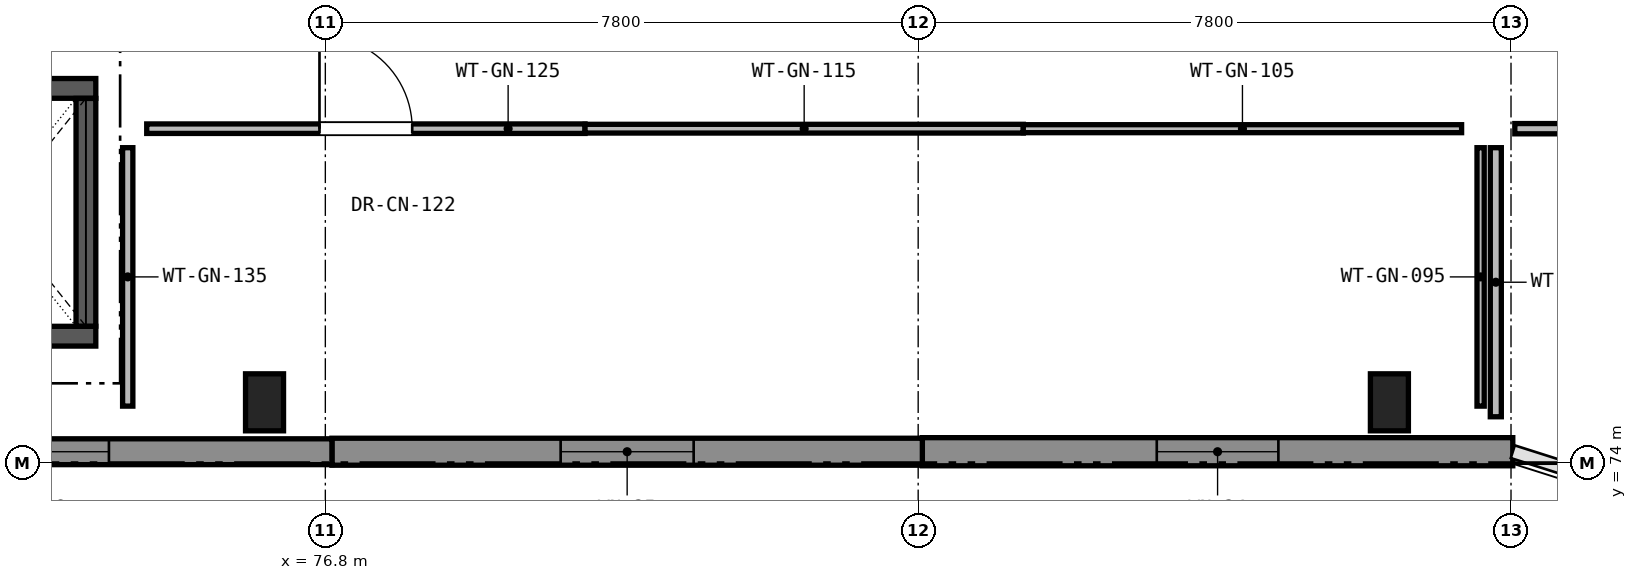
"""IFC4 building model, lengths in metres.
Left out: names, types, materials, properties, quantities, classifications, styles, units other than length and angle.
Written with IfcOpenShell. Run it as: python <this file> out.ifc"""

import sys

from ifc_helpers import new_model, si_unit, direction, frame, frame_2d, origin, origin_2d, place, context, subcontext, project, spatial, rectangle, extrude, element, fill, save


model = new_model("IFC4")
c1 = context("Model", 3, precision=1e-05, world=origin(), true_north=direction((0.0, 1.0)))
c2 = subcontext(c1, "Body", "Model", "MODEL_VIEW")
j1 = project(units=[si_unit("LENGTHUNIT", "METRE"), si_unit("PLANEANGLEUNIT", "RADIAN")], contexts=[c1])
p1 = place(None, origin())
s1 = spatial("IfcSite", under=j1, at=p1, CompositionType="ELEMENT")
p2 = place(p1, origin())
s2 = spatial("IfcBuilding", under=s1, at=p2, CompositionType="ELEMENT")
p3 = place(p2, frame((0.0, 0.0, 5.1)))
s3 = spatial("IfcBuildingStorey", under=s2, at=p3, CompositionType="ELEMENT", Elevation=5.1)
for number, where, z_axis, x_axis in (
    (1, (76.0, 74.8, 0.0), (0.0, 0.0, 1.0), (1.0, 0.0, 0.0)),
    (2, (90.8, 74.8, 0.0), (0.0, 0.0, 1.0), (1.0, 0.0, 0.0)),
):
    element("IfcColumn", number, at=place(p3, frame(where, z_axis=z_axis, x_axis=x_axis)), inside=s3, PredefinedType="COLUMN", context=c2, shape_type="SweptSolid", body=[
        extrude(rectangle(XDim=0.5, YDim=0.75, at=origin_2d()), origin(), (0.0, 0.0, 1.0), 4.42),
    ])
p4 = place(p3, frame((92.423, 74.15, 0.0), z_axis=(0.0, 0.0, 1.0), x_axis=(-1.0, 0.0, 0.0)))
e3 = element("IfcWall", 3, at=p4, inside=s3, PredefinedType="SOLIDWALL", context=c2, shape_type="SweptSolid", body=[
    extrude(rectangle(XDim=7.768, YDim=0.37, at=frame_2d((3.884, 0.0))), origin(), (0.0, 0.0, 1.0), 4.145),
])
p5 = place(p4, frame((3.084, 0.0, 0.9)))
e4 = element("IfcOpeningElement", 4, at=p5, cuts=e3, PredefinedType="OPENING", context=c2, shape_type="SweptSolid", body=[
    extrude(rectangle(XDim=1.6, YDim=2.0, at=frame_2d((0.8, 1.0))), frame((0.0, 0.195, 0.0), z_axis=(0.0, -1.0, 0.0), x_axis=(1.0, 0.0, 0.0)), (0.0, 0.0, 1.0), 0.39),
])
p6 = place(p3, frame((84.655, 74.15, 0.0), z_axis=(0.0, 0.0, 1.0), x_axis=(-1.0, 0.0, 0.0)))
e5 = element("IfcWall", 5, at=p6, inside=s3, PredefinedType="SOLIDWALL", context=c2, shape_type="SweptSolid", body=[
    extrude(rectangle(XDim=7.768, YDim=0.355, at=frame_2d((3.884, 0.0))), origin(), (0.0, 0.0, 1.0), 4.145),
])
p7 = place(p6, frame((3.009, 0.0, 0.9)))
e6 = element("IfcOpeningElement", 6, at=p7, cuts=e5, PredefinedType="OPENING", context=c2, shape_type="SweptSolid", body=[
    extrude(rectangle(XDim=1.75, YDim=2.0, at=frame_2d((0.875, 1.0))), frame((0.0, 0.188, 0.0), z_axis=(0.0, -1.0, 0.0), x_axis=(1.0, 0.0, 0.0)), (0.0, 0.0, 1.0), 0.375),
])
p8 = place(p3, frame((76.887, 74.15, 0.0), z_axis=(0.0, 0.0, 1.0), x_axis=(-1.0, 0.0, 0.0)))
e7 = element("IfcWall", 7, at=p8, inside=s3, PredefinedType="SOLIDWALL", context=c2, shape_type="SweptSolid", body=[
    extrude(rectangle(XDim=7.768, YDim=0.34, at=frame_2d((3.884, 0.0))), origin(), (0.0, 0.0, 1.0), 4.145),
])
p9 = place(p8, frame((2.934, 0.0, 0.9)))
e8 = element("IfcOpeningElement", 8, at=p9, cuts=e7, PredefinedType="OPENING", context=c2, shape_type="SweptSolid", body=[
    extrude(rectangle(XDim=1.9, YDim=2.0, at=frame_2d((0.95, 1.0))), frame((0.0, 0.18, 0.0), z_axis=(0.0, -1.0, 0.0), x_axis=(1.0, 0.0, 0.0)), (0.0, 0.0, 1.0), 0.36),
])
p10 = place(p3, frame((71.122, 75.67, 0.0), z_axis=(0.0, 0.0, 1.0), x_axis=(1.0, 0.0, 0.0)))
e9 = element("IfcWall", 9, at=p10, inside=s3, PredefinedType="SHEAR", context=c2, shape_type="SweptSolid", body=[
    extrude(rectangle(XDim=2.658, YDim=0.26, at=frame_2d((1.329, 0.0))), origin(), (0.0, 0.0, 1.0), 4.145),
])
p11 = place(p3, frame((71.122, 78.93, 0.0), z_axis=(0.0, 0.0, 1.0), x_axis=(1.0, 0.0, 0.0)))
e10 = element("IfcWall", 10, at=p11, inside=s3, PredefinedType="SHEAR", context=c2, shape_type="SweptSolid", body=[
    extrude(rectangle(XDim=2.658, YDim=0.26, at=frame_2d((1.329, 0.0))), origin(), (0.0, 0.0, 1.0), 4.145),
])
p12 = place(p11, frame((0.679, 0.0, 0.0)))
e11 = element("IfcOpeningElement", 11, at=p12, cuts=e10, PredefinedType="OPENING", context=c2, shape_type="SweptSolid", body=[
    extrude(rectangle(XDim=1.3, YDim=2.2, at=frame_2d((0.65, 1.1))), frame((0.0, 0.14, 0.0), z_axis=(0.0, -1.0, 0.0), x_axis=(1.0, 0.0, 0.0)), (0.0, 0.0, 1.0), 0.28),
])
p13 = place(p3, frame((73.65, 75.802, 0.0), z_axis=(0.0, 0.0, 1.0), x_axis=(0.0, 1.0, 0.0)))
e12 = element("IfcWall", 12, at=p13, inside=s3, PredefinedType="SHEAR", context=c2, shape_type="SweptSolid", body=[
    extrude(rectangle(XDim=2.996, YDim=0.26, at=frame_2d((1.498, 0.0))), origin(), (0.0, 0.0, 1.0), 4.145),
])
p14 = place(p3, frame((74.2, 74.75, 0.0), z_axis=(0.0, 0.0, 1.0), x_axis=(0.0, 1.0, 0.0)))
e13 = element("IfcWall", 13, at=p14, inside=s3, PredefinedType="PARTITIONING", context=c2, shape_type="SweptSolid", body=[
    extrude(rectangle(XDim=3.4, YDim=0.135, at=frame_2d((1.7, 0.0))), origin(), (0.0, 0.0, 1.0), 3.545),
])
p15 = place(p3, frame((74.45, 78.4, 0.0), z_axis=(0.0, 0.0, 1.0), x_axis=(1.0, 0.0, 0.0)))
e14 = element("IfcWall", 14, at=p15, inside=s3, PredefinedType="PARTITIONING", context=c2, shape_type="SweptSolid", body=[
    extrude(rectangle(XDim=5.767, YDim=0.125, at=frame_2d((2.884, 0.0))), origin(), (0.0, 0.0, 1.0), 3.595),
])
p16 = place(p15, frame((2.273, 0.0, 0.0)))
e15 = element("IfcOpeningElement", 15, at=p16, cuts=e14, PredefinedType="OPENING", context=c2, shape_type="SweptSolid", body=[
    extrude(rectangle(XDim=1.22, YDim=2.2, at=frame_2d((0.61, 1.1))), frame((0.0, 0.073, 0.0), z_axis=(0.0, -1.0, 0.0), x_axis=(1.0, 0.0, 0.0)), (0.0, 0.0, 1.0), 0.145),
])
p17 = place(p3, frame((80.217, 78.4, 0.0), z_axis=(0.0, 0.0, 1.0), x_axis=(1.0, 0.0, 0.0)))
e16 = element("IfcWall", 16, at=p17, inside=s3, PredefinedType="PARTITIONING", context=c2, shape_type="SweptSolid", body=[
    extrude(rectangle(XDim=5.766, YDim=0.115, at=frame_2d((2.883, 0.0))), origin(), (0.0, 0.0, 1.0), 4.145),
])
p18 = place(p3, frame((85.983, 78.4, 0.0), z_axis=(0.0, 0.0, 1.0), x_axis=(1.0, 0.0, 0.0)))
e17 = element("IfcWall", 17, at=p18, inside=s3, PredefinedType="PARTITIONING", context=c2, shape_type="SweptSolid", body=[
    extrude(rectangle(XDim=5.767, YDim=0.105, at=frame_2d((2.884, 0.0))), origin(), (0.0, 0.0, 1.0), 3.395),
])
p19 = place(p3, frame((92.0, 78.15, 0.0), z_axis=(0.0, 0.0, 1.0), x_axis=(0.0, -1.0, 0.0)))
e18 = element("IfcWall", 18, at=p19, inside=s3, PredefinedType="PARTITIONING", context=c2, shape_type="SweptSolid", body=[
    extrude(rectangle(XDim=3.4, YDim=0.095, at=frame_2d((1.7, 0.0))), origin(), (0.0, 0.0, 1.0), 3.445),
])
p20 = place(p3, frame((92.2, 74.61, 0.0), z_axis=(0.0, 0.0, 1.0), x_axis=(0.0, 1.0, 0.0)))
e19 = element("IfcWall", 19, at=p20, inside=s3, PredefinedType="PARTITIONING", context=c2, shape_type="SweptSolid", body=[
    extrude(rectangle(XDim=3.54, YDim=0.145, at=frame_2d((1.77, 0.0))), origin(), (0.0, 0.0, 1.0), 3.445),
])
p21 = place(p3, frame((92.45, 78.4, 0.0), z_axis=(0.0, 0.0, 1.0), x_axis=(1.0, 0.0, 0.0)))
e20 = element("IfcWall", 20, at=p21, inside=s3, PredefinedType="PARTITIONING", context=c2, shape_type="SweptSolid", body=[
    extrude(rectangle(XDim=6.557, YDim=0.135, at=frame_2d((3.279, 0.0))), origin(), (0.0, 0.0, 1.0), 3.495),
])
p22 = place(p21, frame((2.689, 0.0, 0.0)))
e21 = element("IfcOpeningElement", 21, at=p22, cuts=e20, PredefinedType="OPENING", context=c2, shape_type="SweptSolid", body=[
    extrude(rectangle(XDim=1.18, YDim=2.2, at=frame_2d((0.59, 1.1))), frame((0.0, 0.077, 0.0), z_axis=(0.0, -1.0, 0.0), x_axis=(1.0, 0.0, 0.0)), (0.0, 0.0, 1.0), 0.155),
])
p23 = place(p5, origin())
e22 = element("IfcWindow", 22, at=p23, inside=s3, PartitioningType="SINGLE_PANEL", PredefinedType="WINDOW", context=c2, shape_type="SweptSolid", body=[
    extrude(rectangle(XDim=1.6, YDim=2.0, at=frame_2d((0.8, 1.0))), frame((0.0, 0.03, 0.0), z_axis=(0.0, -1.0, 0.0), x_axis=(1.0, 0.0, 0.0)), (0.0, 0.0, 1.0), 0.06),
])
fill(e4, e22)
p24 = place(p7, origin())
e23 = element("IfcWindow", 23, at=p24, inside=s3, PartitioningType="SINGLE_PANEL", PredefinedType="WINDOW", context=c2, shape_type="SweptSolid", body=[
    extrude(rectangle(XDim=1.75, YDim=2.0, at=frame_2d((0.875, 1.0))), frame((0.0, 0.03, 0.0), z_axis=(0.0, -1.0, 0.0), x_axis=(1.0, 0.0, 0.0)), (0.0, 0.0, 1.0), 0.06),
])
fill(e6, e23)
p25 = place(p9, origin())
e24 = element("IfcWindow", 24, at=p25, inside=s3, PartitioningType="SINGLE_PANEL", PredefinedType="WINDOW", context=c2, shape_type="SweptSolid", body=[
    extrude(rectangle(XDim=1.9, YDim=2.0, at=frame_2d((0.95, 1.0))), frame((0.0, 0.03, 0.0), z_axis=(0.0, -1.0, 0.0), x_axis=(1.0, 0.0, 0.0)), (0.0, 0.0, 1.0), 0.06),
])
fill(e8, e24)
p26 = place(p16, origin())
e25 = element("IfcDoor", 25, at=p26, inside=s3, OperationType="SINGLE_SWING_LEFT", PredefinedType="DOOR", context=c2, shape_type="SweptSolid", body=[
    extrude(rectangle(XDim=1.22, YDim=2.2, at=frame_2d((0.61, 1.1))), frame((0.0, 0.025, 0.0), z_axis=(0.0, -1.0, 0.0), x_axis=(1.0, 0.0, 0.0)), (0.0, 0.0, 1.0), 0.05),
])
fill(e15, e25)
save(model, sys.argv[1])
